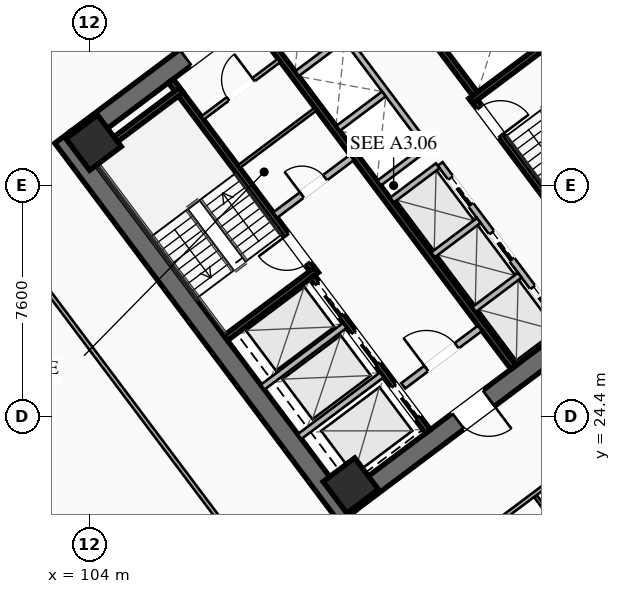
"""IFC4 building model, lengths in metres.
Left out: names, types, materials, properties, quantities, classifications, styles, units other than length and angle.
Written with IfcOpenShell. Run it as: python <this file> out.ifc"""

import sys

from ifc_helpers import new_model, si_unit, direction, frame, frame_2d, origin, origin_2d, place, context, subcontext, project, spatial, rectangle, hollow_rectangle, extrude, element, fill, save


model = new_model("IFC4")
c1 = context("Model", 3, precision=1e-05, world=origin(), true_north=direction((0.0, 1.0)))
c2 = subcontext(c1, "Body", "Model", "MODEL_VIEW")
j1 = project(units=[si_unit("LENGTHUNIT", "METRE"), si_unit("PLANEANGLEUNIT", "RADIAN")], contexts=[c1])
p1 = place(None, origin())
s1 = spatial("IfcSite", under=j1, at=p1, CompositionType="ELEMENT")
p2 = place(p1, origin())
s2 = spatial("IfcBuilding", under=s1, at=p2, CompositionType="ELEMENT")
p3 = place(p2, frame((0.0, 0.0, 56.55)))
s3 = spatial("IfcBuildingStorey", under=s2, at=p3, CompositionType="ELEMENT", Elevation=56.55)
for number, where, z_axis, x_axis in (
    (1, (112.476, 21.107, 0.0), (0.0, 0.0, 1.0), (-0.6, 0.8, 0.0)),
    (2, (115.524, 42.893, 0.0), (0.0, 0.0, 1.0), (0.6, -0.8, 0.0)),
):
    element("IfcWall", number, at=place(p3, frame(where, z_axis=z_axis, x_axis=x_axis)), inside=s3, PredefinedType="SHEAR", context=c2, shape_type="SweptSolid", body=[
        extrude(rectangle(XDim=15.6, YDim=0.65, at=frame_2d((7.8, 0.0))), origin(), (0.0, 0.0, 1.0), 3.55),
    ])
p4 = place(p3, frame((124.429, 30.478, 0.0), z_axis=(0.0, 0.0, 1.0), x_axis=(-0.799998028465, -0.600002628705, 0.0)))
e3 = element("IfcWall", 3, at=p4, inside=s3, PredefinedType="SHEAR", context=c2, shape_type="SweptSolid", body=[
    extrude(rectangle(XDim=14.86, YDim=0.65, at=frame_2d((7.43, 0.0))), origin(), (0.0, 0.0, 1.0), 3.55),
])
p5 = place(p4, frame((9.13, 0.0, 0.0)))
e4 = element("IfcOpeningElement", 4, at=p5, cuts=e3, PredefinedType="OPENING", context=c2, shape_type="SweptSolid", body=[
    extrude(rectangle(XDim=1.25, YDim=2.25, at=frame_2d((0.625, 1.125))), frame((0.0, 0.335, 0.0), z_axis=(0.0, -1.0, 0.0), x_axis=(1.0, 0.0, 0.0)), (0.0, 0.0, 1.0), 0.67),
])
p6 = place(p4, frame((4.08, 0.0, 0.0)))
e5 = element("IfcOpeningElement", 5, at=p6, cuts=e3, PredefinedType="OPENING", context=c2, shape_type="SweptSolid", body=[
    extrude(rectangle(XDim=1.25, YDim=2.25, at=frame_2d((0.625, 1.125))), frame((0.0, 0.335, 0.0), z_axis=(0.0, -1.0, 0.0), x_axis=(1.0, 0.0, 0.0)), (0.0, 0.0, 1.0), 0.67),
])
p7 = place(p3, frame((103.571, 33.522, 0.0), z_axis=(0.0, 0.0, 1.0), x_axis=(0.799998028465, 0.600002628705, 0.0)))
e6 = element("IfcWall", 6, at=p7, inside=s3, PredefinedType="SHEAR", context=c2, shape_type="SweptSolid", body=[
    extrude(rectangle(XDim=14.86, YDim=0.65, at=frame_2d((7.43, 0.0))), origin(), (0.0, 0.0, 1.0), 3.55),
])
p8 = place(p7, frame((4.48, 0.0, 0.0)))
e7 = element("IfcOpeningElement", 7, at=p8, cuts=e6, PredefinedType="OPENING", context=c2, shape_type="SweptSolid", body=[
    extrude(rectangle(XDim=1.25, YDim=2.25, at=frame_2d((0.625, 1.125))), frame((0.0, 0.335, 0.0), z_axis=(0.0, -1.0, 0.0), x_axis=(1.0, 0.0, 0.0)), (0.0, 0.0, 1.0), 0.67),
])
p9 = place(p7, frame((9.53, 0.0, 0.0)))
e8 = element("IfcOpeningElement", 8, at=p9, cuts=e6, PredefinedType="OPENING", context=c2, shape_type="SweptSolid", body=[
    extrude(rectangle(XDim=1.25, YDim=2.25, at=frame_2d((0.625, 1.125))), frame((0.0, 0.335, 0.0), z_axis=(0.0, -1.0, 0.0), x_axis=(1.0, 0.0, 0.0)), (0.0, 0.0, 1.0), 0.67),
])
for number, where, z_axis, x_axis in (
    (9, (112.59, 22.13, 0.0), (0.0, 0.0, 1.0), (0.8, 0.6, 0.0)),
    (10, (104.13, 33.41, 0.0), (0.0, 0.0, 1.0), (0.8, 0.6, 0.0)),
):
    element("IfcColumn", number, at=place(p3, frame(where, z_axis=z_axis, x_axis=x_axis)), inside=s3, PredefinedType="COLUMN", context=c2, shape_type="SweptSolid", body=[
        extrude(hollow_rectangle(XDim=1.3, YDim=1.3, WallThickness=0.05, at=origin_2d()), origin(), (0.0, 0.0, 1.0), 3.35),
    ])
p10 = place(p3, frame((111.44, 29.08, 0.0), z_axis=(0.0, 0.0, 1.0), x_axis=(-0.600009827119, 0.799992629566, 0.0)))
e11 = element("IfcWall", 11, at=p10, inside=s3, PredefinedType="SHEAR", context=c2, shape_type="SweptSolid", body=[
    extrude(rectangle(XDim=7.95, YDim=0.2, at=frame_2d((3.975, 0.0))), origin(), (0.0, 0.0, 1.0), 3.35),
])
p11 = place(p10, frame((0.45, 0.0, 0.0)))
e12 = element("IfcOpeningElement", 12, at=p11, cuts=e11, PredefinedType="OPENING", context=c2, shape_type="SweptSolid", body=[
    extrude(rectangle(XDim=1.15, YDim=2.2, at=frame_2d((0.575, 1.1))), frame((0.0, 0.11, 0.0), z_axis=(0.0, -1.0, 0.0), x_axis=(1.0, 0.0, 0.0)), (0.0, 0.0, 1.0), 0.22),
])
for number, where, z_axis, x_axis in (
    (13, (108.476, 26.982, 0.0), (0.0, 0.0, 1.0), (0.8, 0.6, 0.0)),
    (14, (104.036, 32.902, 0.0), (0.0, 0.0, 1.0), (0.8, 0.6, 0.0)),
):
    element("IfcWall", number, at=place(p3, frame(where, z_axis=z_axis, x_axis=x_axis)), inside=s3, PredefinedType="SHEAR", context=c2, shape_type="SweptSolid", body=[
        extrude(rectangle(XDim=3.73, YDim=0.2, at=frame_2d((1.865, 0.0))), origin(), (0.0, 0.0, 1.0), 3.35),
    ])
p12 = place(p3, frame((116.56, 34.92, 0.0), z_axis=(0.0, 0.0, 1.0), x_axis=(0.600009827119, -0.799992629566, 0.0)))
e15 = element("IfcWall", 15, at=p12, inside=s3, PredefinedType="SHEAR", context=c2, shape_type="SweptSolid", body=[
    extrude(rectangle(XDim=7.95, YDim=0.2, at=frame_2d((3.975, 0.0))), origin(), (0.0, 0.0, 1.0), 3.35),
])
p13 = place(p12, frame((0.45, 0.0, 0.0)))
e16 = element("IfcOpeningElement", 16, at=p13, cuts=e15, PredefinedType="OPENING", context=c2, shape_type="SweptSolid", body=[
    extrude(rectangle(XDim=1.15, YDim=2.2, at=frame_2d((0.575, 1.1))), frame((0.0, 0.11, 0.0), z_axis=(0.0, -1.0, 0.0), x_axis=(1.0, 0.0, 0.0)), (0.0, 0.0, 1.0), 0.22),
])
p14 = place(p3, frame((116.54, 34.78, 0.0), z_axis=(0.0, 0.0, 1.0), x_axis=(0.799984290658, 0.600020945218, 0.0)))
e17 = element("IfcWall", 17, at=p14, inside=s3, PredefinedType="SHEAR", context=c2, shape_type="SweptSolid", body=[
    extrude(rectangle(XDim=3.73, YDim=0.2, at=frame_2d((1.865, 0.0))), origin(), (0.0, 0.0, 1.0), 3.35),
])
p15 = place(p3, frame((117.938, 26.016, 0.0), z_axis=(0.0, 0.0, 1.0), x_axis=(-0.600005463273, 0.799995902516, 0.0)))
e18 = element("IfcWall", 18, at=p15, inside=s3, PredefinedType="SHEAR", context=c2, shape_type="SweptSolid", body=[
    extrude(rectangle(XDim=14.3, YDim=0.2, at=frame_2d((7.15, 0.0))), origin(), (0.0, 0.0, 1.0), 3.35),
])
p16 = place(p3, frame((110.104, 31.028, 0.0), z_axis=(0.0, 0.0, 1.0), x_axis=(0.800018601094, 0.59997519774, 0.0)))
e19 = element("IfcWall", 19, at=p16, inside=s3, PredefinedType="SOLIDWALL", context=c2, shape_type="SweptSolid", body=[
    extrude(rectangle(XDim=3.15, YDim=0.22, at=frame_2d((1.575, 0.0))), origin(), (0.0, 0.0, 1.0), 2.703),
])
p17 = place(p16, frame((1.1, 0.0, 0.0)))
e20 = element("IfcOpeningElement", 20, at=p17, cuts=e19, PredefinedType="OPENING", context=c2, shape_type="SweptSolid", body=[
    extrude(rectangle(XDim=0.95, YDim=2.05, at=frame_2d((0.475, 1.025))), frame((0.0, 0.12, 0.0), z_axis=(0.0, -1.0, 0.0), x_axis=(1.0, 0.0, 0.0)), (0.0, 0.0, 1.0), 0.24),
])
p18 = place(p3, frame((114.316, 25.412, 0.0), z_axis=(0.0, 0.0, 1.0), x_axis=(0.800018601094, 0.59997519774, 0.0)))
e21 = element("IfcWall", 21, at=p18, inside=s3, PredefinedType="SOLIDWALL", context=c2, shape_type="SweptSolid", body=[
    extrude(rectangle(XDim=3.15, YDim=0.22, at=frame_2d((1.575, 0.0))), origin(), (0.0, 0.0, 1.0), 2.703),
])
p19 = place(p18, frame((0.95, 0.0, 0.0)))
e22 = element("IfcOpeningElement", 22, at=p19, cuts=e21, PredefinedType="OPENING", context=c2, shape_type="SweptSolid", body=[
    extrude(rectangle(XDim=1.25, YDim=2.25, at=frame_2d((0.625, 1.125))), frame((0.0, 0.12, 0.0), z_axis=(0.0, -1.0, 0.0), x_axis=(1.0, 0.0, 0.0)), (0.0, 0.0, 1.0), 0.24),
])
p20 = place(p3, frame((115.13, 23.91, 0.0), z_axis=(0.0, 0.0, 1.0), x_axis=(-0.599975393228, 0.800018454488, 0.0)))
e23 = element("IfcWall", 23, at=p20, inside=s3, PredefinedType="SHEAR", context=c2, shape_type="SweptSolid", body=[
    extrude(rectangle(XDim=6.35, YDim=0.2, at=frame_2d((3.175, 0.0))), origin(), (0.0, 0.0, 1.0), 3.35),
])
p21 = place(p20, frame((4.775, 0.0, 0.0)))
e24 = element("IfcOpeningElement", 24, at=p21, cuts=e23, PredefinedType="OPENING", context=c2, shape_type="SweptSolid", body=[
    extrude(rectangle(XDim=1.3, YDim=2.25, at=frame_2d((0.65, 1.125))), frame((0.0, 0.11, 0.0), z_axis=(0.0, -1.0, 0.0), x_axis=(1.0, 0.0, 0.0)), (0.0, 0.0, 1.0), 0.22),
])
p22 = place(p20, frame((2.775, 0.0, 0.0)))
e25 = element("IfcOpeningElement", 25, at=p22, cuts=e23, PredefinedType="OPENING", context=c2, shape_type="SweptSolid", body=[
    extrude(rectangle(XDim=1.3, YDim=2.25, at=frame_2d((0.65, 1.125))), frame((0.0, 0.11, 0.0), z_axis=(0.0, -1.0, 0.0), x_axis=(1.0, 0.0, 0.0)), (0.0, 0.0, 1.0), 0.22),
])
p23 = place(p20, frame((0.575, 0.0, 0.0)))
e26 = element("IfcOpeningElement", 26, at=p23, cuts=e23, PredefinedType="OPENING", context=c2, shape_type="SweptSolid", body=[
    extrude(rectangle(XDim=1.3, YDim=2.25, at=frame_2d((0.65, 1.125))), frame((0.0, 0.11, 0.0), z_axis=(0.0, -1.0, 0.0), x_axis=(1.0, 0.0, 0.0)), (0.0, 0.0, 1.0), 0.22),
])
for number, where, z_axis, x_axis in (
    (27, (110.906, 23.742, 0.0), (0.0, 0.0, 1.0), (0.8, 0.6, 0.0)),
    (28, (109.688, 25.366, 0.0), (0.0, 0.0, 1.0), (0.8, 0.6, 0.0)),
):
    element("IfcWall", number, at=place(p3, frame(where, z_axis=z_axis, x_axis=x_axis)), inside=s3, PredefinedType="SOLIDWALL", context=c2, shape_type="SweptSolid", body=[
        extrude(rectangle(XDim=3.38, YDim=0.2, at=frame_2d((1.69, 0.0))), origin(), (0.0, 0.0, 1.0), 3.35),
    ])
p24 = place(p3, frame((112.87, 40.09, 0.0), z_axis=(0.0, 0.0, 1.0), x_axis=(0.599975393228, -0.800018454488, 0.0)))
e29 = element("IfcWall", 29, at=p24, inside=s3, PredefinedType="SHEAR", context=c2, shape_type="SweptSolid", body=[
    extrude(rectangle(XDim=6.35, YDim=0.2, at=frame_2d((3.175, 0.0))), origin(), (0.0, 0.0, 1.0), 3.35),
])
p25 = place(p3, frame((107.71, 34.22, 0.0), z_axis=(0.0, 0.0, 1.0), x_axis=(0.799981399002, 0.60002480053, 0.0)))
e30 = element("IfcWall", 30, at=p25, inside=s3, PredefinedType="PARTITIONING", context=c2, shape_type="SweptSolid", body=[
    extrude(rectangle(XDim=3.15, YDim=0.135, at=frame_2d((1.575, 0.0))), origin(), (0.0, 0.0, 1.0), 2.703),
])
p26 = place(p25, frame((1.05, 0.0, 0.0)))
e31 = element("IfcOpeningElement", 31, at=p26, cuts=e30, PredefinedType="OPENING", context=c2, shape_type="SweptSolid", body=[
    extrude(rectangle(XDim=1.05, YDim=2.2, at=frame_2d((0.525, 1.1))), frame((0.0, 0.077, 0.0), z_axis=(0.0, -1.0, 0.0), x_axis=(1.0, 0.0, 0.0)), (0.0, 0.0, 1.0), 0.155),
])
p27 = place(p3, frame((108.91, 32.62, 0.0), z_axis=(0.0, 0.0, 1.0), x_axis=(0.800018601094, 0.59997519774, 0.0)))
e32 = element("IfcWall", 32, at=p27, inside=s3, PredefinedType="PARTITIONING", context=c2, shape_type="SweptSolid", body=[
    extrude(rectangle(XDim=3.15, YDim=0.11, at=frame_2d((1.575, 0.0))), origin(), (0.0, 0.0, 1.0), 2.703),
])
p28 = place(p3, frame((119.61, 27.27, 0.0), z_axis=(0.0, 0.0, 1.0), x_axis=(-0.600011488909, 0.79999138319, 0.0)))
e33 = element("IfcWall", 33, at=p28, inside=s3, PredefinedType="SOLIDWALL", context=c2, shape_type="SweptSolid", body=[
    extrude(rectangle(XDim=6.8, YDim=0.2, at=frame_2d((3.4, 0.0))), origin(), (0.0, 0.0, 1.0), 3.35),
])
p29 = place(p28, frame((0.625, 0.0, 0.0)))
e34 = element("IfcOpeningElement", 34, at=p29, cuts=e33, PredefinedType="OPENING", context=c2, shape_type="SweptSolid", body=[
    extrude(rectangle(XDim=1.1, YDim=2.2, at=frame_2d((0.55, 1.1))), frame((0.0, 0.11, 0.0), z_axis=(0.0, -1.0, 0.0), x_axis=(1.0, 0.0, 0.0)), (0.0, 0.0, 1.0), 0.22),
])
p30 = place(p28, frame((2.875, 0.0, 0.0)))
e35 = element("IfcOpeningElement", 35, at=p30, cuts=e33, PredefinedType="OPENING", context=c2, shape_type="SweptSolid", body=[
    extrude(rectangle(XDim=1.1, YDim=2.2, at=frame_2d((0.55, 1.1))), frame((0.0, 0.11, 0.0), z_axis=(0.0, -1.0, 0.0), x_axis=(1.0, 0.0, 0.0)), (0.0, 0.0, 1.0), 0.22),
])
p31 = place(p28, frame((5.125, 0.0, 0.0)))
e36 = element("IfcOpeningElement", 36, at=p31, cuts=e33, PredefinedType="OPENING", context=c2, shape_type="SweptSolid", body=[
    extrude(rectangle(XDim=1.1, YDim=2.2, at=frame_2d((0.55, 1.1))), frame((0.0, 0.11, 0.0), z_axis=(0.0, -1.0, 0.0), x_axis=(1.0, 0.0, 0.0)), (0.0, 0.0, 1.0), 0.22),
])
p32 = place(p3, frame((116.646, 27.922, 0.0), z_axis=(0.0, 0.0, 1.0), x_axis=(0.8, 0.6, 0.0)))
e37 = element("IfcWall", 37, at=p32, inside=s3, PredefinedType="SOLIDWALL", context=c2, shape_type="SweptSolid", body=[
    extrude(rectangle(XDim=1.88, YDim=0.2, at=frame_2d((0.94, 0.0))), origin(), (0.0, 0.0, 1.0), 3.35),
])
p33 = place(p3, frame((115.296, 29.722, 0.0), z_axis=(0.0, 0.0, 1.0), x_axis=(0.799984418148, 0.600020775241, 0.0)))
e38 = element("IfcWall", 38, at=p33, inside=s3, PredefinedType="SOLIDWALL", context=c2, shape_type="SweptSolid", body=[
    extrude(rectangle(XDim=1.88, YDim=0.2, at=frame_2d((0.94, 0.0))), origin(), (0.0, 0.0, 1.0), 3.35),
])
p34 = place(p3, frame((113.946, 31.522, 0.0), z_axis=(0.0, 0.0, 1.0), x_axis=(0.8, 0.6, 0.0)))
e39 = element("IfcWall", 39, at=p34, inside=s3, PredefinedType="SOLIDWALL", context=c2, shape_type="SweptSolid", body=[
    extrude(rectangle(XDim=1.88, YDim=0.2, at=frame_2d((0.94, 0.0))), origin(), (0.0, 0.0, 1.0), 3.35),
])
p35 = place(p3, frame((115.11, 33.27, 0.0), z_axis=(0.0, 0.0, 1.0), x_axis=(-0.600011488909, 0.79999138319, 0.0)))
e40 = element("IfcWall", 40, at=p35, inside=s3, PredefinedType="SOLIDWALL", context=c2, shape_type="SweptSolid", body=[
    extrude(rectangle(XDim=6.8, YDim=0.2, at=frame_2d((3.4, 0.0))), origin(), (0.0, 0.0, 1.0), 3.35),
])
p36 = place(p3, frame((113.526, 32.082, 0.0), z_axis=(0.0, 0.0, 1.0), x_axis=(0.800046745961, 0.599937666993, 0.0)))
e41 = element("IfcWall", 41, at=p36, inside=s3, PredefinedType="SOLIDWALL", context=c2, shape_type="SweptSolid", body=[
    extrude(rectangle(XDim=1.88, YDim=0.2, at=frame_2d((0.94, 0.0))), origin(), (0.0, 0.0, 1.0), 3.35),
])
p37 = place(p3, frame((112.176, 33.882, 0.0), z_axis=(0.0, 0.0, 1.0), x_axis=(0.8, 0.6, 0.0)))
e42 = element("IfcWall", 42, at=p37, inside=s3, PredefinedType="SOLIDWALL", context=c2, shape_type="SweptSolid", body=[
    extrude(rectangle(XDim=1.88, YDim=0.2, at=frame_2d((0.94, 0.0))), origin(), (0.0, 0.0, 1.0), 3.35),
])
p38 = place(p3, frame((110.826, 35.682, 0.0), z_axis=(0.0, 0.0, 1.0), x_axis=(0.799984418148, 0.600020775241, 0.0)))
e43 = element("IfcWall", 43, at=p38, inside=s3, PredefinedType="SOLIDWALL", context=c2, shape_type="SweptSolid", body=[
    extrude(rectangle(XDim=1.88, YDim=0.2, at=frame_2d((0.94, 0.0))), origin(), (0.0, 0.0, 1.0), 3.35),
])
p39 = place(p3, frame((98.174, 34.468, 0.0), z_axis=(0.0, 0.0, 1.0), x_axis=(0.800000982127, 0.599998690494, 0.0)))
e44 = element("IfcWall", 44, at=p39, inside=s3, PredefinedType="PARTITIONING", context=c2, shape_type="SweptSolid", body=[
    extrude(rectangle(XDim=29.83, YDim=0.135, at=frame_2d((14.915, 0.0))), origin(), (0.0, 0.0, 1.0), 2.703),
])
p40 = place(p39, frame((0.3, 0.0, 0.0)))
e45 = element("IfcOpeningElement", 45, at=p40, cuts=e44, PredefinedType="OPENING", context=c2, shape_type="SweptSolid", body=[
    extrude(rectangle(XDim=0.95, YDim=2.05, at=frame_2d((0.475, 1.025))), frame((0.0, 0.077, 0.0), z_axis=(0.0, -1.0, 0.0), x_axis=(1.0, 0.0, 0.0)), (0.0, 0.0, 1.0), 0.155),
])
p41 = place(p39, frame((10.913, 0.0, 0.0)))
e46 = element("IfcOpeningElement", 46, at=p41, cuts=e44, PredefinedType="OPENING", context=c2, shape_type="SweptSolid", body=[
    extrude(rectangle(XDim=0.95, YDim=2.05, at=frame_2d((0.475, 1.025))), frame((0.0, 0.077, 0.0), z_axis=(0.0, -1.0, 0.0), x_axis=(1.0, 0.0, 0.0)), (0.0, 0.0, 1.0), 0.155),
])
p42 = place(p39, frame((28.58, 0.0, 0.0)))
e47 = element("IfcOpeningElement", 47, at=p42, cuts=e44, PredefinedType="OPENING", context=c2, shape_type="SweptSolid", body=[
    extrude(rectangle(XDim=0.95, YDim=2.05, at=frame_2d((0.475, 1.025))), frame((0.0, 0.077, 0.0), z_axis=(0.0, -1.0, 0.0), x_axis=(1.0, 0.0, 0.0)), (0.0, 0.0, 1.0), 0.155),
])
p43 = place(p3, frame((135.46, 34.47, 0.0), z_axis=(0.0, 0.0, 1.0), x_axis=(-0.800000982127, -0.599998690494, 0.0)))
e48 = element("IfcWall", 48, at=p43, inside=s3, PredefinedType="PARTITIONING", context=c2, shape_type="SweptSolid", body=[
    extrude(rectangle(XDim=29.83, YDim=0.135, at=frame_2d((14.915, 0.0))), origin(), (0.0, 0.0, 1.0), 2.703),
])
p44 = place(p43, frame((28.5, 0.0, 0.0)))
e49 = element("IfcOpeningElement", 49, at=p44, cuts=e48, PredefinedType="OPENING", context=c2, shape_type="SweptSolid", body=[
    extrude(rectangle(XDim=0.95, YDim=2.05, at=frame_2d((0.475, 1.025))), frame((0.0, 0.077, 0.0), z_axis=(0.0, -1.0, 0.0), x_axis=(1.0, 0.0, 0.0)), (0.0, 0.0, 1.0), 0.155),
])
p45 = place(p43, frame((17.938, 0.0, 0.0)))
e50 = element("IfcOpeningElement", 50, at=p45, cuts=e48, PredefinedType="OPENING", context=c2, shape_type="SweptSolid", body=[
    extrude(rectangle(XDim=0.95, YDim=2.05, at=frame_2d((0.475, 1.025))), frame((0.0, 0.077, 0.0), z_axis=(0.0, -1.0, 0.0), x_axis=(1.0, 0.0, 0.0)), (0.0, 0.0, 1.0), 0.155),
])
p46 = place(p43, frame((0.38, 0.0, 0.0)))
e51 = element("IfcOpeningElement", 51, at=p46, cuts=e48, PredefinedType="OPENING", context=c2, shape_type="SweptSolid", body=[
    extrude(rectangle(XDim=0.95, YDim=2.05, at=frame_2d((0.475, 1.025))), frame((0.0, 0.077, 0.0), z_axis=(0.0, -1.0, 0.0), x_axis=(1.0, 0.0, 0.0)), (0.0, 0.0, 1.0), 0.155),
])
p47 = place(p3, frame((125.088, 13.216, 0.0), z_axis=(0.0, 0.0, 1.0), x_axis=(-0.600003650761, 0.799997261916, 0.0)))
e52 = element("IfcWall", 52, at=p47, inside=s3, PredefinedType="PARTITIONING", context=c2, shape_type="SweptSolid", body=[
    extrude(rectangle(XDim=10.7, YDim=0.11, at=frame_2d((5.35, 0.0))), origin(), (0.0, 0.0, 1.0), 2.703),
])
p48 = place(p3, frame((111.548, 16.636, 0.0), z_axis=(0.0, 0.0, 1.0), x_axis=(-0.600003517529, 0.799997361841, 0.0)))
e53 = element("IfcWall", 53, at=p48, inside=s3, PredefinedType="PARTITIONING", context=c2, shape_type="SweptSolid", body=[
    extrude(rectangle(XDim=22.21, YDim=0.135, at=frame_2d((11.105, 0.0))), origin(), (0.0, 0.0, 1.0), 2.703),
])
p49 = place(p48, frame((20.96, 0.0, 0.0)))
e54 = element("IfcOpeningElement", 54, at=p49, cuts=e53, PredefinedType="OPENING", context=c2, shape_type="SweptSolid", body=[
    extrude(rectangle(XDim=0.95, YDim=2.05, at=frame_2d((0.475, 1.025))), frame((0.0, 0.077, 0.0), z_axis=(0.0, -1.0, 0.0), x_axis=(1.0, 0.0, 0.0)), (0.0, 0.0, 1.0), 0.155),
])
p50 = place(p8, origin())
e55 = element("IfcDoor", 55, at=p50, inside=s3, OperationType="SINGLE_SWING_LEFT", PredefinedType="DOOR", context=c2, shape_type="SweptSolid", body=[
    extrude(rectangle(XDim=1.25, YDim=2.25, at=frame_2d((0.625, 1.125))), frame((0.0, 0.025, 0.0), z_axis=(0.0, -1.0, 0.0), x_axis=(1.0, 0.0, 0.0)), (0.0, 0.0, 1.0), 0.05),
])
fill(e7, e55)
p51 = place(p5, origin())
e56 = element("IfcDoor", 56, at=p51, inside=s3, OperationType="SINGLE_SWING_LEFT", PredefinedType="DOOR", context=c2, shape_type="SweptSolid", body=[
    extrude(rectangle(XDim=1.25, YDim=2.25, at=frame_2d((0.625, 1.125))), frame((0.0, 0.025, 0.0), z_axis=(0.0, -1.0, 0.0), x_axis=(1.0, 0.0, 0.0)), (0.0, 0.0, 1.0), 0.05),
])
fill(e4, e56)
p52 = place(p11, origin())
e57 = element("IfcDoor", 57, at=p52, inside=s3, OperationType="SINGLE_SWING_RIGHT", PredefinedType="DOOR", context=c2, shape_type="SweptSolid", body=[
    extrude(rectangle(XDim=1.15, YDim=2.2, at=frame_2d((0.575, 1.1))), frame((0.0, 0.025, 0.0), z_axis=(0.0, -1.0, 0.0), x_axis=(1.0, 0.0, 0.0)), (0.0, 0.0, 1.0), 0.05),
])
fill(e12, e57)
p53 = place(p13, origin())
e58 = element("IfcDoor", 58, at=p53, inside=s3, OperationType="SINGLE_SWING_RIGHT", PredefinedType="DOOR", context=c2, shape_type="SweptSolid", body=[
    extrude(rectangle(XDim=1.15, YDim=2.2, at=frame_2d((0.575, 1.1))), frame((0.0, 0.025, 0.0), z_axis=(0.0, -1.0, 0.0), x_axis=(1.0, 0.0, 0.0)), (0.0, 0.0, 1.0), 0.05),
])
fill(e16, e58)
p54 = place(p19, origin())
e59 = element("IfcDoor", 59, at=p54, inside=s3, OperationType="SINGLE_SWING_LEFT", PredefinedType="DOOR", context=c2, shape_type="SweptSolid", body=[
    extrude(rectangle(XDim=1.25, YDim=2.25, at=frame_2d((0.625, 1.125))), frame((0.0, 0.025, 0.0), z_axis=(0.0, -1.0, 0.0), x_axis=(1.0, 0.0, 0.0)), (0.0, 0.0, 1.0), 0.05),
])
fill(e22, e59)
p55 = place(p26, origin())
e60 = element("IfcDoor", 60, at=p55, inside=s3, OperationType="SINGLE_SWING_RIGHT", PredefinedType="DOOR", context=c2, shape_type="SweptSolid", body=[
    extrude(rectangle(XDim=1.05, YDim=2.2, at=frame_2d((0.525, 1.1))), frame((0.0, 0.025, 0.0), z_axis=(0.0, -1.0, 0.0), x_axis=(1.0, 0.0, 0.0)), (0.0, 0.0, 1.0), 0.05),
])
fill(e31, e60)
p56 = place(p17, origin())
e61 = element("IfcDoor", 61, at=p56, inside=s3, OperationType="SINGLE_SWING_LEFT", PredefinedType="DOOR", context=c2, shape_type="SweptSolid", body=[
    extrude(rectangle(XDim=0.95, YDim=2.05, at=frame_2d((0.475, 1.025))), frame((0.0, 0.025, 0.0), z_axis=(0.0, -1.0, 0.0), x_axis=(1.0, 0.0, 0.0)), (0.0, 0.0, 1.0), 0.05),
])
fill(e20, e61)
p57 = place(p21, origin())
e62 = element("IfcDoor", 62, at=p57, inside=s3, OperationType="SLIDING_TO_LEFT", PredefinedType="DOOR", context=c2, shape_type="SweptSolid", body=[
    extrude(rectangle(XDim=1.3, YDim=2.25, at=frame_2d((0.65, 1.125))), frame((0.0, 0.025, 0.0), z_axis=(0.0, -1.0, 0.0), x_axis=(1.0, 0.0, 0.0)), (0.0, 0.0, 1.0), 0.05),
])
fill(e24, e62)
p58 = place(p22, origin())
e63 = element("IfcDoor", 63, at=p58, inside=s3, OperationType="SLIDING_TO_LEFT", PredefinedType="DOOR", context=c2, shape_type="SweptSolid", body=[
    extrude(rectangle(XDim=1.3, YDim=2.25, at=frame_2d((0.65, 1.125))), frame((0.0, 0.025, 0.0), z_axis=(0.0, -1.0, 0.0), x_axis=(1.0, 0.0, 0.0)), (0.0, 0.0, 1.0), 0.05),
])
fill(e25, e63)
p59 = place(p23, origin())
e64 = element("IfcDoor", 64, at=p59, inside=s3, OperationType="SLIDING_TO_LEFT", PredefinedType="DOOR", context=c2, shape_type="SweptSolid", body=[
    extrude(rectangle(XDim=1.3, YDim=2.25, at=frame_2d((0.65, 1.125))), frame((0.0, 0.025, 0.0), z_axis=(0.0, -1.0, 0.0), x_axis=(1.0, 0.0, 0.0)), (0.0, 0.0, 1.0), 0.05),
])
fill(e26, e64)
p60 = place(p29, origin())
e65 = element("IfcDoor", 65, at=p60, inside=s3, OperationType="SLIDING_TO_LEFT", PredefinedType="DOOR", context=c2, shape_type="SweptSolid", body=[
    extrude(rectangle(XDim=1.1, YDim=2.2, at=frame_2d((0.55, 1.1))), frame((0.0, 0.025, 0.0), z_axis=(0.0, -1.0, 0.0), x_axis=(1.0, 0.0, 0.0)), (0.0, 0.0, 1.0), 0.05),
])
fill(e34, e65)
p61 = place(p30, origin())
e66 = element("IfcDoor", 66, at=p61, inside=s3, OperationType="SLIDING_TO_LEFT", PredefinedType="DOOR", context=c2, shape_type="SweptSolid", body=[
    extrude(rectangle(XDim=1.1, YDim=2.2, at=frame_2d((0.55, 1.1))), frame((0.0, 0.025, 0.0), z_axis=(0.0, -1.0, 0.0), x_axis=(1.0, 0.0, 0.0)), (0.0, 0.0, 1.0), 0.05),
])
fill(e35, e66)
p62 = place(p31, origin())
e67 = element("IfcDoor", 67, at=p62, inside=s3, OperationType="SLIDING_TO_LEFT", PredefinedType="DOOR", context=c2, shape_type="SweptSolid", body=[
    extrude(rectangle(XDim=1.1, YDim=2.2, at=frame_2d((0.55, 1.1))), frame((0.0, 0.025, 0.0), z_axis=(0.0, -1.0, 0.0), x_axis=(1.0, 0.0, 0.0)), (0.0, 0.0, 1.0), 0.05),
])
fill(e36, e67)
save(model, sys.argv[1])
